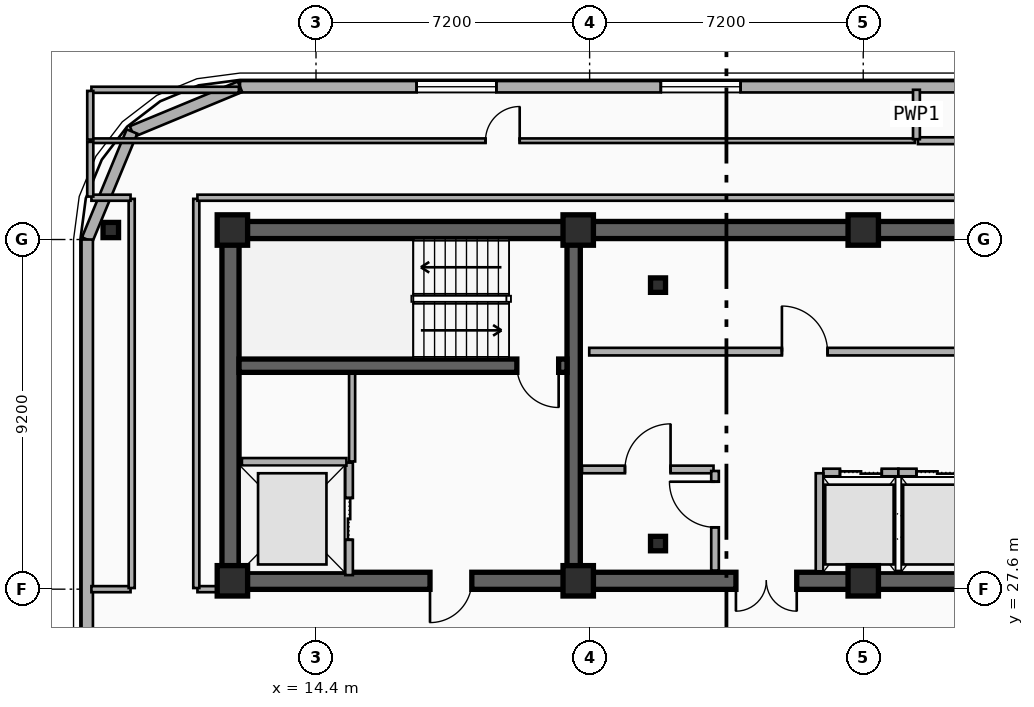
"""IFC4 building model, lengths in metres.
Left out: names, types, materials, properties, quantities, classifications, styles, units other than length and angle.
Written with IfcOpenShell. Run it as: python <this file> out.ifc"""

import sys

from ifc_helpers import new_model, si_unit, direction, frame, frame_2d, origin, origin_2d, place, context, subcontext, project, spatial, rectangle, i_section, extrude, element, fill, save


model = new_model("IFC4")
c1 = context("Model", 3, precision=1e-05, world=origin(), true_north=direction((0.0, 1.0)))
c2 = subcontext(c1, "Body", "Model", "MODEL_VIEW")
j1 = project(units=[si_unit("LENGTHUNIT", "METRE"), si_unit("PLANEANGLEUNIT", "RADIAN")], contexts=[c1])
p1 = place(None, origin())
s1 = spatial("IfcSite", under=j1, at=p1, CompositionType="ELEMENT")
p2 = place(p1, origin())
s2 = spatial("IfcBuilding", under=s1, at=p2, CompositionType="ELEMENT")
p3 = place(p2, frame((0.0, 0.0, 258.4)))
s3 = spatial("IfcBuildingStorey", under=s2, at=p3, CompositionType="ELEMENT", Elevation=258.4)
p4 = place(p3, frame((12.15, 37.05, 0.0), z_axis=(0.0, 0.0, 1.0), x_axis=(1.0, 0.0, 0.0)))
e1 = element("IfcWall", 1, at=p4, inside=s3, PredefinedType="SHEAR", context=c2, shape_type="SweptSolid", body=[
    extrude(rectangle(XDim=33.23, YDim=0.45, at=frame_2d((16.615, 0.0))), origin(), (0.0, 0.0, 1.0), 3.7),
])
p5 = place(p3, frame((21.18, 27.82, 0.0), z_axis=(0.0, 0.0, 1.0), x_axis=(-1.0, 0.0, 0.0)))
e2 = element("IfcWall", 2, at=p5, inside=s3, PredefinedType="SHEAR", context=c2, shape_type="SweptSolid", body=[
    extrude(rectangle(XDim=9.03, YDim=0.45, at=frame_2d((4.515, 0.0))), origin(), (0.0, 0.0, 1.0), 3.7),
])
p6 = place(p5, frame((2.68, 0.0, 0.0)))
e3 = element("IfcOpeningElement", 3, at=p6, cuts=e2, PredefinedType="OPENING", context=c2, shape_type="SweptSolid", body=[
    extrude(rectangle(XDim=1.1, YDim=2.15, at=frame_2d((0.55, 1.075))), frame((0.0, 0.235, 0.0), z_axis=(0.0, -1.0, 0.0), x_axis=(1.0, 0.0, 0.0)), (0.0, 0.0, 1.0), 0.47),
])
p7 = place(p3, frame((33.15, 27.82, 0.0), z_axis=(0.0, 0.0, 1.0), x_axis=(-1.0, 0.0, 0.0)))
e4 = element("IfcWall", 4, at=p7, inside=s3, PredefinedType="SHEAR", context=c2, shape_type="SweptSolid", body=[
    extrude(rectangle(XDim=11.97, YDim=0.45, at=frame_2d((5.985, 0.0))), origin(), (0.0, 0.0, 1.0), 3.7),
])
p8 = place(p7, frame((6.1, 0.0, 0.0)))
e5 = element("IfcOpeningElement", 5, at=p8, cuts=e4, PredefinedType="OPENING", context=c2, shape_type="SweptSolid", body=[
    extrude(rectangle(XDim=1.6, YDim=2.2, at=frame_2d((0.8, 1.1))), frame((0.0, 0.235, 0.0), z_axis=(0.0, -1.0, 0.0), x_axis=(1.0, 0.0, 0.0)), (0.0, 0.0, 1.0), 0.47),
])
p9 = place(p3, frame((12.15, 28.045, 0.0), z_axis=(0.0, 0.0, 1.0), x_axis=(0.0, 1.0, 0.0)))
e6 = element("IfcWall", 6, at=p9, inside=s3, PredefinedType="SHEAR", context=c2, shape_type="SweptSolid", body=[
    extrude(rectangle(XDim=8.78, YDim=0.45, at=frame_2d((4.39, 0.0))), origin(), (0.0, 0.0, 1.0), 3.7),
])
p10 = place(p3, frame((21.18, 28.045, 0.0), z_axis=(0.0, 0.0, 1.0), x_axis=(0.0, 1.0, 0.0)))
e7 = element("IfcWall", 7, at=p10, inside=s3, PredefinedType="SHEAR", context=c2, shape_type="SweptSolid", body=[
    extrude(rectangle(XDim=8.78, YDim=0.35, at=frame_2d((4.39, 0.0))), origin(), (0.0, 0.0, 1.0), 3.7),
])
p11 = place(p3, frame((21.005, 33.48, 0.0), z_axis=(0.0, 0.0, 1.0), x_axis=(-1.0, 0.0, 0.0)))
e8 = element("IfcWall", 8, at=p11, inside=s3, PredefinedType="SHEAR", context=c2, shape_type="SweptSolid", body=[
    extrude(rectangle(XDim=8.63, YDim=0.35, at=frame_2d((4.315, 0.0))), origin(), (0.0, 0.0, 1.0), 3.7),
])
p12 = place(p11, frame((0.22, 0.0, 0.0)))
e9 = element("IfcOpeningElement", 9, at=p12, cuts=e8, PredefinedType="OPENING", context=c2, shape_type="SweptSolid", body=[
    extrude(rectangle(XDim=1.1, YDim=2.15, at=frame_2d((0.55, 1.075))), frame((0.0, 0.185, 0.0), z_axis=(0.0, -1.0, 0.0), x_axis=(1.0, 0.0, 0.0)), (0.0, 0.0, 1.0), 0.37),
])
for number, where, z_axis, x_axis in (
    (10, (23.4, 28.8, 0.0), (0.0, 0.0, 1.0), (1.0, 0.0, 0.0)),
    (11, (23.4, 35.6, 0.0), (0.0, 0.0, 1.0), (1.0, 0.0, 0.0)),
):
    element("IfcColumn", number, at=place(p3, frame(where, z_axis=z_axis, x_axis=x_axis)), inside=s3, PredefinedType="COLUMN", context=c2, shape_type="SweptSolid", body=[
        extrude(i_section(OverallWidth=0.395, OverallDepth=0.38, WebThickness=0.019, FlangeThickness=0.03, FilletRadius=0.015, at=origin_2d()), origin(), (0.0, 0.0, 1.0), 3.7),
    ])
for number, where, z_axis, x_axis in (
    (12, (12.2, 27.82, 0.0), (0.0, 0.0, 1.0), (1.0, 0.0, 0.0)),
    (13, (12.2, 37.05, 0.0), (0.0, 0.0, 1.0), (1.0, 0.0, 0.0)),
    (14, (21.3, 27.82, 0.0), (0.0, 0.0, 1.0), (1.0, 0.0, 0.0)),
    (15, (21.3, 37.05, 0.0), (0.0, 0.0, 1.0), (1.0, 0.0, 0.0)),
    (16, (28.8, 27.82, 0.0), (0.0, 0.0, 1.0), (1.0, 0.0, 0.0)),
    (17, (28.8, 37.05, 0.0), (0.0, 0.0, 1.0), (1.0, 0.0, 0.0)),
):
    element("IfcColumn", number, at=place(p3, frame(where, z_axis=z_axis, x_axis=x_axis)), inside=s3, PredefinedType="COLUMN", context=c2, shape_type="SweptSolid", body=[
        extrude(rectangle(XDim=0.8, YDim=0.8, at=origin_2d()), origin(), (0.0, 0.0, 1.0), 3.7),
    ])
p13 = place(p3, frame((9.0, 37.05, 0.0), z_axis=(0.0, 0.0, 1.0), x_axis=(1.0, 0.0, 0.0)))
e18 = element("IfcColumn", 18, at=p13, inside=s3, PredefinedType="COLUMN", context=c2, shape_type="SweptSolid", body=[
    extrude(i_section(OverallWidth=0.408, OverallDepth=0.4, WebThickness=0.025, FlangeThickness=0.039, FilletRadius=0.015, at=origin_2d()), origin(), (0.0, 0.0, 1.0), 3.7),
])
p14 = place(p3, frame((12.4, 40.82, 0.0), z_axis=(0.0, 0.0, 1.0), x_axis=(1.0, 0.0, 0.0)))
e19 = element("IfcWall", 19, at=p14, inside=s3, PredefinedType="SOLIDWALL", context=c2, shape_type="SweptSolid", body=[
    extrude(rectangle(XDim=32.8, YDim=0.3, at=frame_2d((16.4, 0.0))), origin(), (0.0, 0.0, 1.0), 3.42),
])
p15 = place(p14, frame((4.647, 0.0, 0.75)))
e20 = element("IfcOpeningElement", 20, at=p15, cuts=e19, PredefinedType="OPENING", context=c2, shape_type="SweptSolid", body=[
    extrude(rectangle(XDim=2.1, YDim=2.1, at=frame_2d((1.05, 1.05))), frame((0.0, 0.16, 0.0), z_axis=(0.0, -1.0, 0.0), x_axis=(1.0, 0.0, 0.0)), (0.0, 0.0, 1.0), 0.32),
])
p16 = place(p14, frame((11.073, 0.0, 0.75)))
e21 = element("IfcOpeningElement", 21, at=p16, cuts=e19, PredefinedType="OPENING", context=c2, shape_type="SweptSolid", body=[
    extrude(rectangle(XDim=2.1, YDim=2.1, at=frame_2d((1.05, 1.05))), frame((0.0, 0.16, 0.0), z_axis=(0.0, -1.0, 0.0), x_axis=(1.0, 0.0, 0.0)), (0.0, 0.0, 1.0), 0.32),
])
p17 = place(p14, frame((21.493, 0.0, 0.75)))
e22 = element("IfcOpeningElement", 22, at=p17, cuts=e19, PredefinedType="OPENING", context=c2, shape_type="SweptSolid", body=[
    extrude(rectangle(XDim=2.1, YDim=2.1, at=frame_2d((1.05, 1.05))), frame((0.0, 0.16, 0.0), z_axis=(0.0, -1.0, 0.0), x_axis=(1.0, 0.0, 0.0)), (0.0, 0.0, 1.0), 0.32),
])
p18 = place(p14, frame((26.987, 0.0, 0.75)))
e23 = element("IfcOpeningElement", 23, at=p18, cuts=e19, PredefinedType="OPENING", context=c2, shape_type="SweptSolid", body=[
    extrude(rectangle(XDim=2.1, YDim=2.1, at=frame_2d((1.05, 1.05))), frame((0.0, 0.16, 0.0), z_axis=(0.0, -1.0, 0.0), x_axis=(1.0, 0.0, 0.0)), (0.0, 0.0, 1.0), 0.32),
])
for number, where, z_axis, x_axis in (
    (24, (9.557, 39.643, 0.0), (0.0, 0.0, 1.0), (0.924, 0.383, 0.0)),
    (25, (8.38, 36.8, 0.0), (0.0, 0.0, 1.0), (0.383, 0.924, 0.0)),
):
    element("IfcWall", number, at=place(p3, frame(where, z_axis=z_axis, x_axis=x_axis)), inside=s3, PredefinedType="SOLIDWALL", context=c2, shape_type="SweptSolid", body=[
        extrude(rectangle(XDim=3.077, YDim=0.3, at=frame_2d((1.538, 0.0))), origin(), (0.0, 0.0, 1.0), 3.42),
    ])
p19 = place(p3, frame((8.38, 2.6, 0.0), z_axis=(0.0, 0.0, 1.0), x_axis=(0.0, 1.0, 0.0)))
e26 = element("IfcWall", 26, at=p19, inside=s3, PredefinedType="SOLIDWALL", context=c2, shape_type="SweptSolid", body=[
    extrude(rectangle(XDim=34.2, YDim=0.3, at=frame_2d((17.1, 0.0))), origin(), (0.0, 0.0, 1.0), 3.42),
])
p20 = place(p19, frame((6.33, 0.0, 0.75)))
e27 = element("IfcOpeningElement", 27, at=p20, cuts=e26, PredefinedType="OPENING", context=c2, shape_type="SweptSolid", body=[
    extrude(rectangle(XDim=2.1, YDim=2.1, at=frame_2d((1.05, 1.05))), frame((0.0, 0.16, 0.0), z_axis=(0.0, -1.0, 0.0), x_axis=(1.0, 0.0, 0.0)), (0.0, 0.0, 1.0), 0.32),
])
p21 = place(p19, frame((14.44, 0.0, 0.75)))
e28 = element("IfcOpeningElement", 28, at=p21, cuts=e26, PredefinedType="OPENING", context=c2, shape_type="SweptSolid", body=[
    extrude(rectangle(XDim=2.1, YDim=2.1, at=frame_2d((1.05, 1.05))), frame((0.0, 0.16, 0.0), z_axis=(0.0, -1.0, 0.0), x_axis=(1.0, 0.0, 0.0)), (0.0, 0.0, 1.0), 0.32),
])
p22 = place(p3, frame((15.27, 27.97, 0.0), z_axis=(0.0, 0.0, 1.0), x_axis=(0.0, 1.0, 0.0)))
e29 = element("IfcWall", 29, at=p22, inside=s3, PredefinedType="PARTITIONING", context=c2, shape_type="SweptSolid", body=[
    extrude(rectangle(XDim=2.96, YDim=0.2, at=frame_2d((1.48, 0.0))), origin(), (0.0, 0.0, 1.0), 2.49),
])
p23 = place(p22, frame((0.93, 0.0, 0.0)))
e30 = element("IfcOpeningElement", 30, at=p23, cuts=e29, PredefinedType="OPENING", context=c2, shape_type="SweptSolid", body=[
    extrude(rectangle(XDim=1.1, YDim=2.15, at=frame_2d((0.55, 1.075))), frame((0.0, 0.11, 0.0), z_axis=(0.0, -1.0, 0.0), x_axis=(1.0, 0.0, 0.0)), (0.0, 0.0, 1.0), 0.22),
])
p24 = place(p3, frame((12.45, 30.95, 0.0), z_axis=(0.0, 0.0, 1.0), x_axis=(1.0, 0.0, 0.0)))
e31 = element("IfcWall", 31, at=p24, inside=s3, PredefinedType="PARTITIONING", context=c2, shape_type="SweptSolid", body=[
    extrude(rectangle(XDim=2.75, YDim=0.2, at=frame_2d((1.375, 0.0))), origin(), (0.0, 0.0, 1.0), 2.49),
])
p25 = place(p3, frame((27.75, 30.67, 0.0), z_axis=(0.0, 0.0, 1.0), x_axis=(1.0, 0.0, 0.0)))
e32 = element("IfcWall", 32, at=p25, inside=s3, PredefinedType="PARTITIONING", context=c2, shape_type="SweptSolid", body=[
    extrude(rectangle(XDim=1.975, YDim=0.2, at=frame_2d((0.988, 0.0))), origin(), (0.0, 0.0, 1.0), 2.49),
])
p26 = place(p25, frame((0.438, 0.0, 0.0)))
e33 = element("IfcOpeningElement", 33, at=p26, cuts=e32, PredefinedType="OPENING", context=c2, shape_type="SweptSolid", body=[
    extrude(rectangle(XDim=1.1, YDim=2.15, at=frame_2d((0.55, 1.075))), frame((0.0, 0.11, 0.0), z_axis=(0.0, -1.0, 0.0), x_axis=(1.0, 0.0, 0.0)), (0.0, 0.0, 1.0), 0.22),
])
p27 = place(p3, frame((27.65, 28.07, 0.0), z_axis=(0.0, 0.0, 1.0), x_axis=(0.0, 1.0, 0.0)))
e34 = element("IfcWall", 34, at=p27, inside=s3, PredefinedType="PARTITIONING", context=c2, shape_type="SweptSolid", body=[
    extrude(rectangle(XDim=2.58, YDim=0.2, at=frame_2d((1.29, 0.0))), origin(), (0.0, 0.0, 1.0), 2.49),
])
p28 = place(p3, frame((29.725, 30.67, 0.0), z_axis=(0.0, 0.0, 1.0), x_axis=(1.0, 0.0, 0.0)))
e35 = element("IfcWall", 35, at=p28, inside=s3, PredefinedType="PARTITIONING", context=c2, shape_type="SweptSolid", body=[
    extrude(rectangle(XDim=2.05, YDim=0.2, at=frame_2d((1.025, 0.0))), origin(), (0.0, 0.0, 1.0), 2.8),
])
p29 = place(p28, frame((0.475, 0.0, 0.0)))
e36 = element("IfcOpeningElement", 36, at=p29, cuts=e35, PredefinedType="OPENING", context=c2, shape_type="SweptSolid", body=[
    extrude(rectangle(XDim=1.1, YDim=2.15, at=frame_2d((0.55, 1.075))), frame((0.0, 0.11, 0.0), z_axis=(0.0, -1.0, 0.0), x_axis=(1.0, 0.0, 0.0)), (0.0, 0.0, 1.0), 0.22),
])
p30 = place(p3, frame((21.4, 30.75, 0.0), z_axis=(0.0, 0.0, 1.0), x_axis=(1.0, 0.0, 0.0)))
e37 = element("IfcWall", 37, at=p30, inside=s3, PredefinedType="PARTITIONING", context=c2, shape_type="SweptSolid", body=[
    extrude(rectangle(XDim=3.46, YDim=0.2, at=frame_2d((1.73, 0.0))), origin(), (0.0, 0.0, 1.0), 2.49),
])
p31 = place(p30, frame((1.13, 0.0, 0.0)))
e38 = element("IfcOpeningElement", 38, at=p31, cuts=e37, PredefinedType="OPENING", context=c2, shape_type="SweptSolid", body=[
    extrude(rectangle(XDim=1.2, YDim=2.15, at=frame_2d((0.6, 1.075))), frame((0.0, 0.11, 0.0), z_axis=(0.0, -1.0, 0.0), x_axis=(1.0, 0.0, 0.0)), (0.0, 0.0, 1.0), 0.22),
])
p32 = place(p3, frame((21.59, 33.85, 0.0), z_axis=(0.0, 0.0, 1.0), x_axis=(1.0, 0.0, 0.0)))
e39 = element("IfcWall", 39, at=p32, inside=s3, PredefinedType="PARTITIONING", context=c2, shape_type="SweptSolid", body=[
    extrude(rectangle(XDim=11.34, YDim=0.2, at=frame_2d((5.67, 0.0))), origin(), (0.0, 0.0, 1.0), 2.49),
])
p33 = place(p32, frame((5.07, 0.0, 0.0)))
e40 = element("IfcOpeningElement", 40, at=p33, cuts=e39, PredefinedType="OPENING", context=c2, shape_type="SweptSolid", body=[
    extrude(rectangle(XDim=1.2, YDim=2.15, at=frame_2d((0.6, 1.075))), frame((0.0, 0.11, 0.0), z_axis=(0.0, -1.0, 0.0), x_axis=(1.0, 0.0, 0.0)), (0.0, 0.0, 1.0), 0.22),
])
p34 = place(p3, frame((24.9, 28.09, 0.0), z_axis=(0.0, 0.0, 1.0), x_axis=(0.0, 1.0, 0.0)))
e41 = element("IfcWall", 41, at=p34, inside=s3, PredefinedType="PARTITIONING", context=c2, shape_type="SweptSolid", body=[
    extrude(rectangle(XDim=2.62, YDim=0.2, at=frame_2d((1.31, 0.0))), origin(), (0.0, 0.0, 1.0), 2.8),
])
p35 = place(p34, frame((1.137, 0.0, 0.0)))
e42 = element("IfcOpeningElement", 42, at=p35, cuts=e41, PredefinedType="OPENING", context=c2, shape_type="SweptSolid", body=[
    extrude(rectangle(XDim=1.2, YDim=2.15, at=frame_2d((0.6, 1.075))), frame((0.0, 0.11, 0.0), z_axis=(0.0, -1.0, 0.0), x_axis=(1.0, 0.0, 0.0)), (0.0, 0.0, 1.0), 0.22),
])
p36 = place(p3, frame((8.46, 39.4, 0.0), z_axis=(0.0, 0.0, 1.0), x_axis=(1.0, 0.0, 0.0)))
e43 = element("IfcWall", 43, at=p36, inside=s3, PredefinedType="PARTITIONING", context=c2, shape_type="SweptSolid", body=[
    extrude(rectangle(XDim=21.7, YDim=0.12, at=frame_2d((10.85, 0.0))), origin(), (0.0, 0.0, 1.0), 3.42),
])
p37 = place(p36, frame((10.4, 0.0, 0.0)))
e44 = element("IfcOpeningElement", 44, at=p37, cuts=e43, PredefinedType="OPENING", context=c2, shape_type="SweptSolid", body=[
    extrude(rectangle(XDim=0.9, YDim=2.1, at=frame_2d((0.45, 1.05))), frame((0.0, 0.07, 0.0), z_axis=(0.0, -1.0, 0.0), x_axis=(1.0, 0.0, 0.0)), (0.0, 0.0, 1.0), 0.14),
])
p38 = place(p3, frame((30.24, 39.4, 0.0), z_axis=(0.0, 0.0, 1.0), x_axis=(1.0, 0.0, 0.0)))
e45 = element("IfcWall", 45, at=p38, inside=s3, PredefinedType="PLUMBINGWALL", context=c2, shape_type="SweptSolid", body=[
    extrude(rectangle(XDim=18.9, YDim=0.18, at=frame_2d((9.45, 0.0))), origin(), (0.0, 0.0, 1.0), 3.42),
])
p39 = place(p38, frame((8.95, 0.0, 0.0)))
e46 = element("IfcOpeningElement", 46, at=p39, cuts=e45, PredefinedType="OPENING", context=c2, shape_type="SweptSolid", body=[
    extrude(rectangle(XDim=1.0, YDim=2.15, at=frame_2d((0.5, 1.075))), frame((0.0, 0.1, 0.0), z_axis=(0.0, -1.0, 0.0), x_axis=(1.0, 0.0, 0.0)), (0.0, 0.0, 1.0), 0.2),
])
p40 = place(p3, frame((30.2, 39.44, 0.0), z_axis=(0.0, 0.0, 1.0), x_axis=(0.0, 1.0, 0.0)))
e47 = element("IfcWall", 47, at=p40, inside=s3, PredefinedType="PLUMBINGWALL", context=c2, shape_type="SweptSolid", body=[
    extrude(rectangle(XDim=1.3, YDim=0.18, at=frame_2d((0.65, 0.0))), origin(), (0.0, 0.0, 1.0), 3.42),
])
p41 = place(p3, frame((15.35, 30.96, 0.0), z_axis=(0.0, 0.0, 1.0), x_axis=(0.0, 1.0, 0.0)))
e48 = element("IfcWall", 48, at=p41, inside=s3, PredefinedType="PARTITIONING", context=c2, shape_type="SweptSolid", body=[
    extrude(rectangle(XDim=2.31, YDim=0.16, at=frame_2d((1.155, 0.0))), origin(), (0.0, 0.0, 1.0), 3.42),
])
p42 = place(p3, frame((8.49, 27.6, 0.0), z_axis=(0.0, 0.0, 1.0), x_axis=(1.0, 0.0, 0.0)))
e49 = element("IfcWall", 49, at=p42, inside=s3, PredefinedType="PARTITIONING", context=c2, shape_type="SweptSolid", body=[
    extrude(rectangle(XDim=1.03, YDim=0.16, at=frame_2d((0.515, 0.0))), origin(), (0.0, 0.0, 1.0), 3.42),
])
p43 = place(p3, frame((11.28, 27.6, 0.0), z_axis=(0.0, 0.0, 1.0), x_axis=(1.0, 0.0, 0.0)))
e50 = element("IfcWall", 50, at=p43, inside=s3, PredefinedType="PARTITIONING", context=c2, shape_type="SweptSolid", body=[
    extrude(rectangle(XDim=0.84, YDim=0.16, at=frame_2d((0.42, 0.0))), origin(), (0.0, 0.0, 1.0), 2.49),
])
for number, where, z_axis, x_axis in (
    (51, (9.55, 27.63, 0.0), (0.0, 0.0, 1.0), (0.0, 1.0, 0.0)),
    (52, (11.25, 27.63, 0.0), (0.0, 0.0, 1.0), (0.0, 1.0, 0.0)),
):
    element("IfcWall", number, at=place(p3, frame(where, z_axis=z_axis, x_axis=x_axis)), inside=s3, PredefinedType="PARTITIONING", context=c2, shape_type="SweptSolid", body=[
        extrude(rectangle(XDim=10.24, YDim=0.16, at=frame_2d((5.12, 0.0))), origin(), (0.0, 0.0, 1.0), 2.9),
    ])
p44 = place(p3, frame((8.49, 37.9, 0.0), z_axis=(0.0, 0.0, 1.0), x_axis=(1.0, 0.0, 0.0)))
e53 = element("IfcWall", 53, at=p44, inside=s3, PredefinedType="PARTITIONING", context=c2, shape_type="SweptSolid", body=[
    extrude(rectangle(XDim=1.03, YDim=0.16, at=frame_2d((0.515, 0.0))), origin(), (0.0, 0.0, 1.0), 3.42),
])
p45 = place(p3, frame((11.28, 37.9, 0.0), z_axis=(0.0, 0.0, 1.0), x_axis=(1.0, 0.0, 0.0)))
e54 = element("IfcWall", 54, at=p45, inside=s3, PredefinedType="PARTITIONING", context=c2, shape_type="SweptSolid", body=[
    extrude(rectangle(XDim=35.04, YDim=0.16, at=frame_2d((17.52, 0.0))), origin(), (0.0, 0.0, 1.0), 3.42),
])
p46 = place(p3, frame((8.46, 37.93, 0.0), z_axis=(0.0, 0.0, 1.0), x_axis=(0.0, 1.0, 0.0)))
e55 = element("IfcWall", 55, at=p46, inside=s3, PredefinedType="PARTITIONING", context=c2, shape_type="SweptSolid", body=[
    extrude(rectangle(XDim=1.44, YDim=0.16, at=frame_2d((0.72, 0.0))), origin(), (0.0, 0.0, 1.0), 3.42),
])
p47 = place(p3, frame((8.49, 40.74, 0.0), z_axis=(0.0, 0.0, 1.0), x_axis=(1.0, 0.0, 0.0)))
e56 = element("IfcWall", 56, at=p47, inside=s3, PredefinedType="PARTITIONING", context=c2, shape_type="SweptSolid", body=[
    extrude(rectangle(XDim=3.88, YDim=0.16, at=frame_2d((1.94, 0.0))), origin(), (0.0, 0.0, 1.0), 3.42),
])
p48 = place(p3, frame((8.46, 39.43, 0.0), z_axis=(0.0, 0.0, 1.0), x_axis=(0.0, 1.0, 0.0)))
e57 = element("IfcWall", 57, at=p48, inside=s3, PredefinedType="PARTITIONING", context=c2, shape_type="SweptSolid", body=[
    extrude(rectangle(XDim=1.28, YDim=0.16, at=frame_2d((0.64, 0.0))), origin(), (0.0, 0.0, 1.0), 3.42),
])
p49 = place(p15, origin())
e58 = element("IfcWindow", 58, at=p49, inside=s3, PartitioningType="SINGLE_PANEL", PredefinedType="WINDOW", context=c2, shape_type="SweptSolid", body=[
    extrude(rectangle(XDim=2.1, YDim=2.1, at=frame_2d((1.05, 1.05))), frame((0.0, 0.03, 0.0), z_axis=(0.0, -1.0, 0.0), x_axis=(1.0, 0.0, 0.0)), (0.0, 0.0, 1.0), 0.06),
])
fill(e20, e58)
p50 = place(p16, origin())
e59 = element("IfcWindow", 59, at=p50, inside=s3, PartitioningType="SINGLE_PANEL", PredefinedType="WINDOW", context=c2, shape_type="SweptSolid", body=[
    extrude(rectangle(XDim=2.1, YDim=2.1, at=frame_2d((1.05, 1.05))), frame((0.0, 0.03, 0.0), z_axis=(0.0, -1.0, 0.0), x_axis=(1.0, 0.0, 0.0)), (0.0, 0.0, 1.0), 0.06),
])
fill(e21, e59)
p51 = place(p23, origin())
e60 = element("IfcDoor", 60, at=p51, inside=s3, OperationType="DOUBLE_DOOR_SLIDING", PredefinedType="DOOR", context=c2, shape_type="SweptSolid", body=[
    extrude(rectangle(XDim=1.1, YDim=2.15, at=frame_2d((0.55, 1.075))), frame((0.0, 0.025, 0.0), z_axis=(0.0, -1.0, 0.0), x_axis=(1.0, 0.0, 0.0)), (0.0, 0.0, 1.0), 0.05),
])
fill(e30, e60)
p52 = place(p26, origin())
e61 = element("IfcDoor", 61, at=p52, inside=s3, OperationType="DOUBLE_DOOR_SLIDING", PredefinedType="DOOR", context=c2, shape_type="SweptSolid", body=[
    extrude(rectangle(XDim=1.1, YDim=2.15, at=frame_2d((0.55, 1.075))), frame((0.0, 0.025, 0.0), z_axis=(0.0, -1.0, 0.0), x_axis=(1.0, 0.0, 0.0)), (0.0, 0.0, 1.0), 0.05),
])
fill(e33, e61)
p53 = place(p29, origin())
e62 = element("IfcDoor", 62, at=p53, inside=s3, OperationType="DOUBLE_DOOR_SLIDING", PredefinedType="DOOR", context=c2, shape_type="SweptSolid", body=[
    extrude(rectangle(XDim=1.1, YDim=2.15, at=frame_2d((0.55, 1.075))), frame((0.0, 0.025, 0.0), z_axis=(0.0, -1.0, 0.0), x_axis=(1.0, 0.0, 0.0)), (0.0, 0.0, 1.0), 0.05),
])
fill(e36, e62)
p54 = place(p12, origin())
e63 = element("IfcDoor", 63, at=p54, inside=s3, OperationType="SINGLE_SWING_LEFT", PredefinedType="DOOR", context=c2, shape_type="SweptSolid", body=[
    extrude(rectangle(XDim=1.1, YDim=2.15, at=frame_2d((0.55, 1.075))), frame((0.0, 0.025, 0.0), z_axis=(0.0, -1.0, 0.0), x_axis=(1.0, 0.0, 0.0)), (0.0, 0.0, 1.0), 0.05),
])
fill(e9, e63)
p55 = place(p6, origin())
e64 = element("IfcDoor", 64, at=p55, inside=s3, OperationType="SINGLE_SWING_RIGHT", PredefinedType="DOOR", context=c2, shape_type="SweptSolid", body=[
    extrude(rectangle(XDim=1.1, YDim=2.15, at=frame_2d((0.55, 1.075))), frame((0.0, 0.025, 0.0), z_axis=(0.0, -1.0, 0.0), x_axis=(1.0, 0.0, 0.0)), (0.0, 0.0, 1.0), 0.05),
])
fill(e3, e64)
p56 = place(p8, origin())
e65 = element("IfcDoor", 65, at=p56, inside=s3, OperationType="SINGLE_SWING_LEFT", PredefinedType="DOOR", context=c2, shape_type="SweptSolid", body=[
    extrude(rectangle(XDim=1.6, YDim=2.2, at=frame_2d((0.8, 1.1))), frame((0.0, 0.025, 0.0), z_axis=(0.0, -1.0, 0.0), x_axis=(1.0, 0.0, 0.0)), (0.0, 0.0, 1.0), 0.05),
])
fill(e5, e65)
p57 = place(p31, origin())
e66 = element("IfcDoor", 66, at=p57, inside=s3, OperationType="SINGLE_SWING_RIGHT", PredefinedType="DOOR", context=c2, shape_type="SweptSolid", body=[
    extrude(rectangle(XDim=1.2, YDim=2.15, at=frame_2d((0.6, 1.075))), frame((0.0, 0.025, 0.0), z_axis=(0.0, -1.0, 0.0), x_axis=(1.0, 0.0, 0.0)), (0.0, 0.0, 1.0), 0.05),
])
fill(e38, e66)
p58 = place(p33, origin())
e67 = element("IfcDoor", 67, at=p58, inside=s3, OperationType="SINGLE_SWING_LEFT", PredefinedType="DOOR", context=c2, shape_type="SweptSolid", body=[
    extrude(rectangle(XDim=1.2, YDim=2.15, at=frame_2d((0.6, 1.075))), frame((0.0, 0.025, 0.0), z_axis=(0.0, -1.0, 0.0), x_axis=(1.0, 0.0, 0.0)), (0.0, 0.0, 1.0), 0.05),
])
fill(e40, e67)
p59 = place(p35, origin())
e68 = element("IfcDoor", 68, at=p59, inside=s3, OperationType="SINGLE_SWING_RIGHT", PredefinedType="DOOR", context=c2, shape_type="SweptSolid", body=[
    extrude(rectangle(XDim=1.2, YDim=2.15, at=frame_2d((0.6, 1.075))), frame((0.0, 0.025, 0.0), z_axis=(0.0, -1.0, 0.0), x_axis=(1.0, 0.0, 0.0)), (0.0, 0.0, 1.0), 0.05),
])
fill(e42, e68)
p60 = place(p37, origin())
e69 = element("IfcDoor", 69, at=p60, inside=s3, OperationType="SINGLE_SWING_RIGHT", PredefinedType="DOOR", context=c2, shape_type="SweptSolid", body=[
    extrude(rectangle(XDim=0.9, YDim=2.1, at=frame_2d((0.45, 1.05))), frame((0.0, 0.025, 0.0), z_axis=(0.0, -1.0, 0.0), x_axis=(1.0, 0.0, 0.0)), (0.0, 0.0, 1.0), 0.05),
])
fill(e44, e69)
save(model, sys.argv[1])
